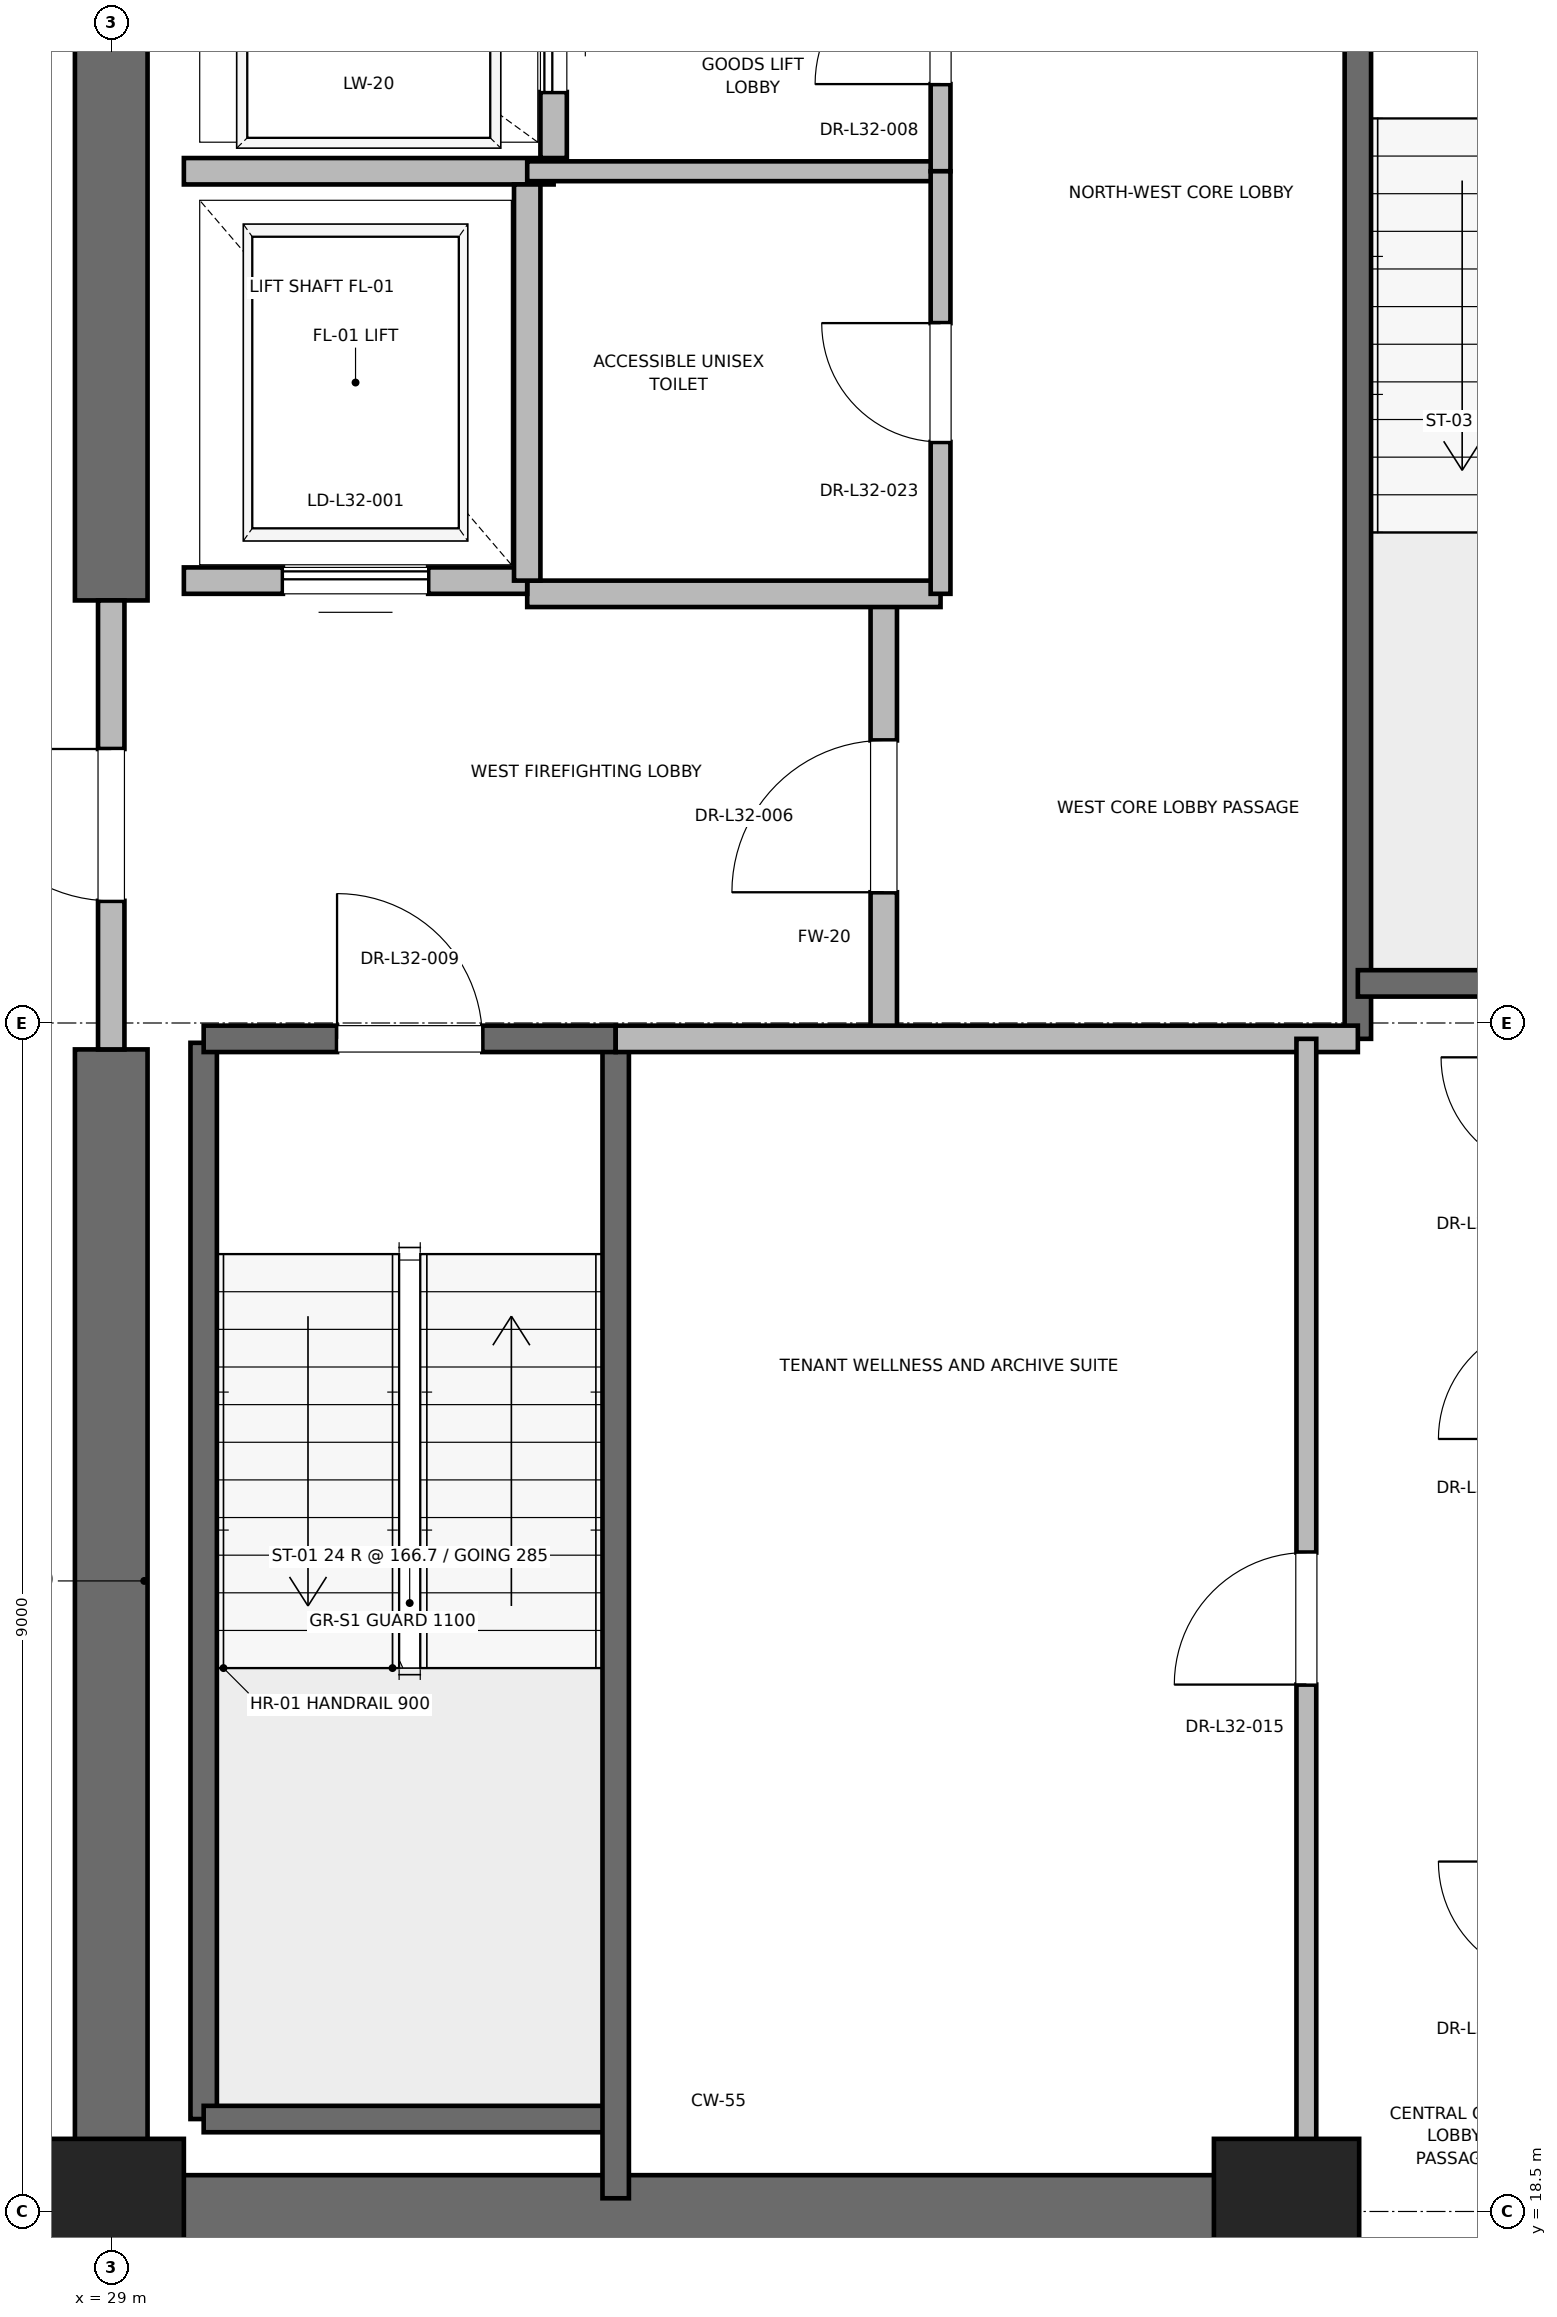
"""IFC4 building model, lengths in metres.
Left out: names, types, materials, properties, quantities, classifications, styles, units other than length and angle.
Written with IfcOpenShell. Run it as: python <this file> out.ifc"""

import sys

from ifc_helpers import new_model, si_unit, direction, frame, frame_2d, origin, origin_2d, place, context, subcontext, project, spatial, rectangle, extrude, element, fill, save


model = new_model("IFC4")
c1 = context("Model", 3, precision=1e-05, world=origin(), true_north=direction((0.0, 1.0)))
c2 = subcontext(c1, "Body", "Model", "MODEL_VIEW")
j1 = project(units=[si_unit("LENGTHUNIT", "METRE"), si_unit("PLANEANGLEUNIT", "RADIAN")], contexts=[c1])
p1 = place(None, origin())
s1 = spatial("IfcSite", under=j1, at=p1, CompositionType="ELEMENT")
p2 = place(p1, origin())
s2 = spatial("IfcBuilding", under=s1, at=p2, CompositionType="ELEMENT")
p3 = place(p2, frame((0.0, 0.0, 140.4)))
s3 = spatial("IfcBuildingStorey", under=s2, at=p3, CompositionType="ELEMENT", Elevation=140.4)
for number, where, z_axis, x_axis in (
    (1, (29.0, 18.5, 0.0), (0.0, 0.0, 1.0), (1.0, 0.0, 0.0)),
    (2, (37.9, 18.5, 0.0), (0.0, 0.0, 1.0), (1.0, 0.0, 0.0)),
):
    element("IfcColumn", number, at=place(p3, frame(where, z_axis=z_axis, x_axis=x_axis)), inside=s3, PredefinedType="PILASTER", context=c2, shape_type="SweptSolid", body=[
        extrude(rectangle(XDim=1.1, YDim=1.1, at=origin_2d()), origin(), (0.0, 0.0, 1.0), 4.0),
    ])
p4 = place(p3, frame((29.0, 18.5, 0.0), z_axis=(0.0, 0.0, 1.0), x_axis=(1.0, 0.0, 0.0)))
e3 = element("IfcWall", 3, at=p4, inside=s3, PredefinedType="SHEAR", context=c2, shape_type="SweptSolid", body=[
    extrude(rectangle(XDim=9.2, YDim=0.55, at=frame_2d((4.6, 0.0))), origin(), (0.0, 0.0, 1.0), 3.775),
])
p5 = place(p3, frame((29.0, 18.5, 0.0), z_axis=(0.0, 0.0, 1.0), x_axis=(0.0, 1.0, 0.0)))
e4 = element("IfcWall", 4, at=p5, inside=s3, PredefinedType="SHEAR", context=c2, shape_type="SweptSolid", body=[
    extrude(rectangle(XDim=8.8, YDim=0.55, at=frame_2d((4.4, 0.0))), origin(), (0.0, 0.0, 1.0), 3.775),
])
p6 = place(p3, frame((29.0, 30.7, 0.0), z_axis=(0.0, 0.0, 1.0), x_axis=(0.0, 1.0, 0.0)))
e5 = element("IfcWall", 5, at=p6, inside=s3, PredefinedType="SHEAR", context=c2, shape_type="SweptSolid", body=[
    extrude(rectangle(XDim=5.8, YDim=0.55, at=frame_2d((2.9, 0.0))), origin(), (0.0, 0.0, 1.0), 3.775),
])
p7 = place(p3, frame((29.7, 19.2, 0.0), z_axis=(0.0, 0.0, 1.0), x_axis=(0.0, 1.0, 0.0)))
e6 = element("IfcWall", 6, at=p7, inside=s3, PredefinedType="SOLIDWALL", context=c2, shape_type="SweptSolid", body=[
    extrude(rectangle(XDim=8.15, YDim=0.2, at=frame_2d((4.075, 0.0))), origin(), (0.0, 0.0, 1.0), 3.775),
])
p8 = place(p3, frame((29.7, 19.2, 0.0), z_axis=(0.0, 0.0, 1.0), x_axis=(1.0, 0.0, 0.0)))
e7 = element("IfcWall", 7, at=p8, inside=s3, PredefinedType="SOLIDWALL", context=c2, shape_type="SweptSolid", body=[
    extrude(rectangle(XDim=3.12, YDim=0.2, at=frame_2d((1.56, 0.0))), origin(), (0.0, 0.0, 1.0), 3.775),
])
p9 = place(p3, frame((32.82, 18.6, 0.0), z_axis=(0.0, 0.0, 1.0), x_axis=(0.0, 1.0, 0.0)))
e8 = element("IfcWall", 8, at=p9, inside=s3, PredefinedType="SOLIDWALL", context=c2, shape_type="SweptSolid", body=[
    extrude(rectangle(XDim=8.78, YDim=0.2, at=frame_2d((4.39, 0.0))), origin(), (0.0, 0.0, 1.0), 3.775),
])
p10 = place(p3, frame((29.7, 27.38, 0.0), z_axis=(0.0, 0.0, 1.0), x_axis=(1.0, 0.0, 0.0)))
e9 = element("IfcWall", 9, at=p10, inside=s3, PredefinedType="SOLIDWALL", context=c2, shape_type="SweptSolid", body=[
    extrude(rectangle(XDim=3.12, YDim=0.2, at=frame_2d((1.56, 0.0))), origin(), (0.0, 0.0, 1.0), 3.775),
])
p11 = place(p10, frame((1.01, 0.0, 0.0)))
e10 = element("IfcOpeningElement", 10, at=p11, cuts=e9, PredefinedType="OPENING", context=c2, shape_type="SweptSolid", body=[
    extrude(rectangle(XDim=1.1, YDim=2.15, at=frame_2d((0.55, 1.075))), frame((0.0, 0.1, 0.0), z_axis=(0.0, -1.0, 0.0), x_axis=(1.0, 0.0, 0.0)), (0.0, 0.0, 1.0), 0.2),
])
p12 = place(p3, frame((38.44, 27.38, 0.0), z_axis=(0.0, 0.0, 1.0), x_axis=(0.0, 1.0, 0.0)))
e11 = element("IfcWall", 11, at=p12, inside=s3, PredefinedType="SOLIDWALL", context=c2, shape_type="SweptSolid", body=[
    extrude(rectangle(XDim=8.87, YDim=0.2, at=frame_2d((4.435, 0.0))), origin(), (0.0, 0.0, 1.0), 3.775),
])
p13 = place(p3, frame((38.44, 27.8, 0.0), z_axis=(0.0, 0.0, 1.0), x_axis=(1.0, 0.0, 0.0)))
e12 = element("IfcWall", 12, at=p13, inside=s3, PredefinedType="SOLIDWALL", context=c2, shape_type="SweptSolid", body=[
    extrude(rectangle(XDim=3.32, YDim=0.2, at=frame_2d((1.66, 0.0))), origin(), (0.0, 0.0, 1.0), 3.775),
])
p14 = place(p3, frame((34.85, 27.38, 0.0), z_axis=(0.0, 0.0, 1.0), x_axis=(0.0, 1.0, 0.0)))
e13 = element("IfcWall", 13, at=p14, inside=s3, PredefinedType="PARTITIONING", context=c2, shape_type="SweptSolid", body=[
    extrude(rectangle(XDim=3.37, YDim=0.2, at=frame_2d((1.685, 0.0))), origin(), (0.0, 0.0, 1.0), 3.775),
])
p15 = place(p14, frame((1.11, 0.0, 0.0)))
e14 = element("IfcOpeningElement", 14, at=p15, cuts=e13, PredefinedType="OPENING", context=c2, shape_type="SweptSolid", body=[
    extrude(rectangle(XDim=1.15, YDim=2.2, at=frame_2d((0.575, 1.1))), frame((0.0, 0.1, 0.0), z_axis=(0.0, -1.0, 0.0), x_axis=(1.0, 0.0, 0.0)), (0.0, 0.0, 1.0), 0.2),
])
p16 = place(p3, frame((29.0, 27.3, 0.0), z_axis=(0.0, 0.0, 1.0), x_axis=(0.0, 1.0, 0.0)))
e15 = element("IfcWall", 15, at=p16, inside=s3, PredefinedType="PARTITIONING", context=c2, shape_type="SweptSolid", body=[
    extrude(rectangle(XDim=3.4, YDim=0.2, at=frame_2d((1.7, 0.0))), origin(), (0.0, 0.0, 1.0), 2.755),
])
p17 = place(p16, frame((1.125, 0.0, 0.0)))
e16 = element("IfcOpeningElement", 16, at=p17, cuts=e15, PredefinedType="OPENING", context=c2, shape_type="SweptSolid", body=[
    extrude(rectangle(XDim=1.15, YDim=2.2, at=frame_2d((0.575, 1.1))), frame((0.0, 0.1, 0.0), z_axis=(0.0, -1.0, 0.0), x_axis=(1.0, 0.0, 0.0)), (0.0, 0.0, 1.0), 0.2),
])
p18 = place(p3, frame((32.82, 27.38, 0.0), z_axis=(0.0, 0.0, 1.0), x_axis=(1.0, 0.0, 0.0)))
e17 = element("IfcWall", 17, at=p18, inside=s3, PredefinedType="PARTITIONING", context=c2, shape_type="SweptSolid", body=[
    extrude(rectangle(XDim=5.62, YDim=0.2, at=frame_2d((2.81, 0.0))), origin(), (0.0, 0.0, 1.0), 3.775),
])
p19 = place(p3, frame((32.15, 30.75, 0.0), z_axis=(0.0, 0.0, 1.0), x_axis=(1.0, 0.0, 0.0)))
e18 = element("IfcWall", 18, at=p19, inside=s3, PredefinedType="PARTITIONING", context=c2, shape_type="SweptSolid", body=[
    extrude(rectangle(XDim=3.13, YDim=0.2, at=frame_2d((1.565, 0.0))), origin(), (0.0, 0.0, 1.0), 3.775),
])
p20 = place(p3, frame((29.55, 30.85, 0.0), z_axis=(0.0, 0.0, 1.0), x_axis=(1.0, 0.0, 0.0)))
e19 = element("IfcWall", 19, at=p20, inside=s3, PredefinedType="SOLIDWALL", context=c2, shape_type="SweptSolid", body=[
    extrude(rectangle(XDim=2.6, YDim=0.2, at=frame_2d((1.3, 0.0))), origin(), (0.0, 0.0, 1.0), 2.755),
])
p21 = place(p20, frame((0.75, 0.0, 0.0)))
e20 = element("IfcOpeningElement", 20, at=p21, cuts=e19, PredefinedType="OPENING", context=c2, shape_type="SweptSolid", body=[
    extrude(rectangle(XDim=1.1, YDim=2.2, at=frame_2d((0.55, 1.1))), frame((0.0, 0.1, 0.0), z_axis=(0.0, -1.0, 0.0), x_axis=(1.0, 0.0, 0.0)), (0.0, 0.0, 1.0), 0.2),
])
p22 = place(p3, frame((29.55, 33.95, 0.0), z_axis=(0.0, 0.0, 1.0), x_axis=(1.0, 0.0, 0.0)))
e21 = element("IfcWall", 21, at=p22, inside=s3, PredefinedType="SOLIDWALL", context=c2, shape_type="SweptSolid", body=[
    extrude(rectangle(XDim=2.8, YDim=0.2, at=frame_2d((1.4, 0.0))), origin(), (0.0, 0.0, 1.0), 3.775),
])
p23 = place(p3, frame((32.15, 30.85, 0.0), z_axis=(0.0, 0.0, 1.0), x_axis=(0.0, 1.0, 0.0)))
e22 = element("IfcWall", 22, at=p23, inside=s3, PredefinedType="SOLIDWALL", context=c2, shape_type="SweptSolid", body=[
    extrude(rectangle(XDim=3.0, YDim=0.2, at=frame_2d((1.5, 0.0))), origin(), (0.0, 0.0, 1.0), 3.775),
])
p24 = place(p3, frame((32.35, 34.05, 0.0), z_axis=(0.0, 0.0, 1.0), x_axis=(0.0, 1.0, 0.0)))
e23 = element("IfcWall", 23, at=p24, inside=s3, PredefinedType="SOLIDWALL", context=c2, shape_type="SweptSolid", body=[
    extrude(rectangle(XDim=2.1, YDim=0.2, at=frame_2d((1.05, 0.0))), origin(), (0.0, 0.0, 1.0), 3.775),
])
p25 = place(p24, frame((0.5, 0.0, 0.0)))
e24 = element("IfcOpeningElement", 24, at=p25, cuts=e23, PredefinedType="OPENING", context=c2, shape_type="SweptSolid", body=[
    extrude(rectangle(XDim=1.1, YDim=2.2, at=frame_2d((0.55, 1.1))), frame((0.0, 0.1, 0.0), z_axis=(0.0, -1.0, 0.0), x_axis=(1.0, 0.0, 0.0)), (0.0, 0.0, 1.0), 0.2),
])
p26 = place(p3, frame((32.15, 33.95, 0.0), z_axis=(0.0, 0.0, 1.0), x_axis=(1.0, 0.0, 0.0)))
e25 = element("IfcWall", 25, at=p26, inside=s3, PredefinedType="PARTITIONING", context=c2, shape_type="SweptSolid", body=[
    extrude(rectangle(XDim=3.13, YDim=0.15, at=frame_2d((1.565, 0.0))), origin(), (0.0, 0.0, 1.0), 2.85),
])
p27 = place(p3, frame((35.28, 33.95, 0.0), z_axis=(0.0, 0.0, 1.0), x_axis=(0.0, 1.0, 0.0)))
e26 = element("IfcWall", 26, at=p27, inside=s3, PredefinedType="PARTITIONING", context=c2, shape_type="SweptSolid", body=[
    extrude(rectangle(XDim=2.27, YDim=0.15, at=frame_2d((1.135, 0.0))), origin(), (0.0, 0.0, 1.0), 2.755),
])
p28 = place(p27, frame((0.66, 0.0, 0.0)))
e27 = element("IfcOpeningElement", 27, at=p28, cuts=e26, PredefinedType="OPENING", context=c2, shape_type="SweptSolid", body=[
    extrude(rectangle(XDim=0.95, YDim=2.15, at=frame_2d((0.475, 1.075))), frame((0.0, 0.075, 0.0), z_axis=(0.0, -1.0, 0.0), x_axis=(1.0, 0.0, 0.0)), (0.0, 0.0, 1.0), 0.15),
])
p29 = place(p3, frame((35.28, 30.75, 0.0), z_axis=(0.0, 0.0, 1.0), x_axis=(0.0, 1.0, 0.0)))
e28 = element("IfcWall", 28, at=p29, inside=s3, PredefinedType="PARTITIONING", context=c2, shape_type="SweptSolid", body=[
    extrude(rectangle(XDim=3.2, YDim=0.15, at=frame_2d((1.6, 0.0))), origin(), (0.0, 0.0, 1.0), 2.85),
])
p30 = place(p29, frame((1.15, 0.0, 0.0)))
e29 = element("IfcOpeningElement", 29, at=p30, cuts=e28, PredefinedType="OPENING", context=c2, shape_type="SweptSolid", body=[
    extrude(rectangle(XDim=0.9, YDim=2.1, at=frame_2d((0.45, 1.05))), frame((0.0, 0.075, 0.0), z_axis=(0.0, -1.0, 0.0), x_axis=(1.0, 0.0, 0.0)), (0.0, 0.0, 1.0), 0.15),
])
p31 = place(p3, frame((38.05, 18.6, 0.0), z_axis=(0.0, 0.0, 1.0), x_axis=(0.0, 1.0, 0.0)))
e30 = element("IfcWall", 30, at=p31, inside=s3, PredefinedType="PARTITIONING", context=c2, shape_type="SweptSolid", body=[
    extrude(rectangle(XDim=8.78, YDim=0.15, at=frame_2d((4.39, 0.0))), origin(), (0.0, 0.0, 1.0), 2.755),
])
p32 = place(p31, frame((3.89, 0.0, 0.0)))
e31 = element("IfcOpeningElement", 31, at=p32, cuts=e30, PredefinedType="OPENING", context=c2, shape_type="SweptSolid", body=[
    extrude(rectangle(XDim=1.0, YDim=2.15, at=frame_2d((0.5, 1.075))), frame((0.0, 0.075, 0.0), z_axis=(0.0, -1.0, 0.0), x_axis=(1.0, 0.0, 0.0)), (0.0, 0.0, 1.0), 0.15),
])
p33 = place(p11, origin())
e32 = element("IfcDoor", 32, at=p33, inside=s3, OperationType="SINGLE_SWING_LEFT", PredefinedType="DOOR", context=c2, shape_type="SweptSolid", body=[
    extrude(rectangle(XDim=1.1, YDim=2.15, at=frame_2d((0.55, 1.075))), frame((0.0, 0.025, 0.0), z_axis=(0.0, -1.0, 0.0), x_axis=(1.0, 0.0, 0.0)), (0.0, 0.0, 1.0), 0.05),
])
fill(e10, e32)
p34 = place(p15, origin())
e33 = element("IfcDoor", 33, at=p34, inside=s3, OperationType="SINGLE_SWING_LEFT", PredefinedType="DOOR", context=c2, shape_type="SweptSolid", body=[
    extrude(rectangle(XDim=1.15, YDim=2.2, at=frame_2d((0.575, 1.1))), frame((0.0, 0.025, 0.0), z_axis=(0.0, -1.0, 0.0), x_axis=(1.0, 0.0, 0.0)), (0.0, 0.0, 1.0), 0.05),
])
fill(e14, e33)
p35 = place(p17, origin())
e34 = element("IfcDoor", 34, at=p35, inside=s3, OperationType="SINGLE_SWING_RIGHT", PredefinedType="DOOR", context=c2, shape_type="SweptSolid", body=[
    extrude(rectangle(XDim=1.15, YDim=2.2, at=frame_2d((0.575, 1.1))), frame((0.0, 0.025, 0.0), z_axis=(0.0, -1.0, 0.0), x_axis=(1.0, 0.0, 0.0)), (0.0, 0.0, 1.0), 0.05),
])
fill(e16, e34)
p36 = place(p21, origin())
e35 = element("IfcDoor", 35, at=p36, inside=s3, OperationType="SLIDING_TO_RIGHT", PredefinedType="DOOR", context=c2, shape_type="SweptSolid", body=[
    extrude(rectangle(XDim=1.1, YDim=2.2, at=frame_2d((0.55, 1.1))), frame((0.0, 0.025, 0.0), z_axis=(0.0, -1.0, 0.0), x_axis=(1.0, 0.0, 0.0)), (0.0, 0.0, 1.0), 0.05),
])
fill(e20, e35)
p37 = place(p25, origin())
e36 = element("IfcDoor", 36, at=p37, inside=s3, OperationType="SLIDING_TO_RIGHT", PredefinedType="DOOR", context=c2, shape_type="SweptSolid", body=[
    extrude(rectangle(XDim=1.1, YDim=2.2, at=frame_2d((0.55, 1.1))), frame((0.0, 0.025, 0.0), z_axis=(0.0, -1.0, 0.0), x_axis=(1.0, 0.0, 0.0)), (0.0, 0.0, 1.0), 0.05),
])
fill(e24, e36)
p38 = place(p28, origin())
e37 = element("IfcDoor", 37, at=p38, inside=s3, OperationType="SINGLE_SWING_LEFT", PredefinedType="DOOR", context=c2, shape_type="SweptSolid", body=[
    extrude(rectangle(XDim=0.95, YDim=2.15, at=frame_2d((0.475, 1.075))), frame((0.0, 0.025, 0.0), z_axis=(0.0, -1.0, 0.0), x_axis=(1.0, 0.0, 0.0)), (0.0, 0.0, 1.0), 0.05),
])
fill(e27, e37)
p39 = place(p30, origin())
e38 = element("IfcDoor", 38, at=p39, inside=s3, OperationType="SINGLE_SWING_RIGHT", PredefinedType="DOOR", context=c2, shape_type="SweptSolid", body=[
    extrude(rectangle(XDim=0.9, YDim=2.1, at=frame_2d((0.45, 1.05))), frame((0.0, 0.025, 0.0), z_axis=(0.0, -1.0, 0.0), x_axis=(1.0, 0.0, 0.0)), (0.0, 0.0, 1.0), 0.05),
])
fill(e29, e38)
p40 = place(p32, origin())
e39 = element("IfcDoor", 39, at=p40, inside=s3, OperationType="SINGLE_SWING_LEFT", PredefinedType="DOOR", context=c2, shape_type="SweptSolid", body=[
    extrude(rectangle(XDim=1.0, YDim=2.15, at=frame_2d((0.5, 1.075))), frame((0.0, 0.025, 0.0), z_axis=(0.0, -1.0, 0.0), x_axis=(1.0, 0.0, 0.0)), (0.0, 0.0, 1.0), 0.05),
])
fill(e31, e39)
save(model, sys.argv[1])
